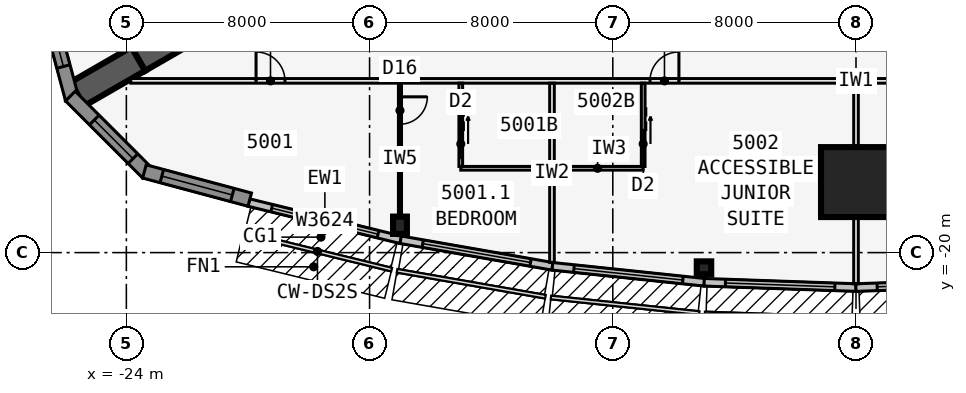
"""IFC4 building model, lengths in metres.
Left out: names, types, materials, properties, quantities, classifications, styles, units other than length and angle.
Written with IfcOpenShell. Run it as: python <this file> out.ifc"""

import sys

from ifc_helpers import new_model, si_unit, direction, frame, frame_2d, origin, origin_2d, place, context, subcontext, project, spatial, polyline, rectangle, i_section, outline, extrude, element, fill, save


model = new_model("IFC4")
c1 = context("Model", 3, precision=1e-05, world=origin(), true_north=direction((0.0, 1.0)))
c2 = subcontext(c1, "Body", "Model", "MODEL_VIEW")
j1 = project(units=[si_unit("LENGTHUNIT", "METRE"), si_unit("PLANEANGLEUNIT", "RADIAN")], contexts=[c1])
p1 = place(None, origin())
s1 = spatial("IfcSite", under=j1, at=p1, CompositionType="ELEMENT")
p2 = place(p1, origin())
s2 = spatial("IfcBuilding", under=s1, at=p2, CompositionType="ELEMENT")
p3 = place(p2, frame((0.0, 0.0, 186.1)))
s3 = spatial("IfcBuildingStorey", under=s2, at=p3, CompositionType="ELEMENT", Elevation=186.1)
for number, where, z_axis, x_axis in (
    (1, (-21.61, -12.477, 0.0), (0.0, 0.0, 1.0), (-0.866, -0.5, 0.0)),
    (2, (-23.61, -13.631, 0.0), (0.0, 0.0, 1.0), (-0.866, -0.5, 0.0)),
):
    element("IfcWall", number, at=place(p3, frame(where, z_axis=z_axis, x_axis=x_axis)), inside=s3, PredefinedType="SHEAR", context=c2, shape_type="SweptSolid", body=[
        extrude(rectangle(XDim=2.309, YDim=0.9, at=frame_2d((1.155, 0.0))), origin(), (0.0, 0.0, 1.0), 3.4),
    ])
p4 = place(p3, frame((-15.0, -19.1, 0.0), z_axis=(0.0, 0.0, 1.0), x_axis=(1.0, 0.0, 0.0)))
e3 = element("IfcColumn", 3, at=p4, inside=s3, PredefinedType="COLUMN", context=c2, shape_type="SweptSolid", body=[
    extrude(i_section(OverallWidth=0.455, OverallDepth=0.569, WebThickness=0.078, FlangeThickness=0.125, at=origin_2d()), origin(), (0.0, 0.0, 1.0), 3.4),
])
p5 = place(p3, frame((-5.0, -20.5, 0.0), z_axis=(0.0, 0.0, 1.0), x_axis=(0.0, -1.0, 0.0)))
e4 = element("IfcColumn", 4, at=p5, inside=s3, PredefinedType="COLUMN", context=c2, shape_type="SweptSolid", body=[
    extrude(i_section(OverallWidth=0.424, OverallDepth=0.475, WebThickness=0.048, FlangeThickness=0.077, at=origin_2d()), origin(), (0.0, 0.0, 1.0), 3.4),
])
p6 = place(p3, frame((0.0, -17.68, 0.0), z_axis=(0.0, 0.0, 1.0), x_axis=(0.0, -1.0, 0.0)))
e5 = element("IfcColumn", 5, at=p6, inside=s3, PredefinedType="COLUMN", context=c2, shape_type="SweptSolid", body=[
    extrude(rectangle(XDim=2.3, YDim=2.3, at=origin_2d()), origin(), (0.0, 0.0, 1.0), 3.4),
])
p7 = place(p3, frame((-19.97, -18.354, 0.0), z_axis=(0.0, 0.0, 1.0), x_axis=(0.971270024053, -0.237980126011, 0.0)))
e6 = element("IfcWall", 6, at=p7, inside=s3, PredefinedType="STANDARD", context=c2, shape_type="SweptSolid", body=[
    extrude(rectangle(XDim=5.148, YDim=0.25, at=frame_2d((2.574, 0.0))), origin(), (0.0, 0.0, 1.0), 3.15),
])
p8 = place(p7, frame((0.774, 0.0, 0.45)))
e7 = element("IfcOpeningElement", 7, at=p8, cuts=e6, PredefinedType="OPENING", context=c2, shape_type="SweptSolid", body=[
    extrude(rectangle(XDim=3.6, YDim=2.4, at=frame_2d((1.8, 1.2))), frame((0.0, 0.135, 0.0), z_axis=(0.0, -1.0, 0.0), x_axis=(1.0, 0.0, 0.0)), (0.0, 0.0, 1.0), 0.27),
])
p9 = place(p3, frame((-14.979, -19.577, 0.0), z_axis=(0.0, 0.0, 1.0), x_axis=(0.985030467156, -0.172380331752, 0.0)))
e8 = element("IfcWall", 8, at=p9, inside=s3, PredefinedType="STANDARD", context=c2, shape_type="SweptSolid", body=[
    extrude(rectangle(XDim=5.076, YDim=0.25, at=frame_2d((2.538, 0.0))), origin(), (0.0, 0.0, 1.0), 3.15),
])
p10 = place(p9, frame((0.738, 0.0, 0.45)))
e9 = element("IfcOpeningElement", 9, at=p10, cuts=e8, PredefinedType="OPENING", context=c2, shape_type="SweptSolid", body=[
    extrude(rectangle(XDim=3.6, YDim=2.4, at=frame_2d((1.8, 1.2))), frame((0.0, 0.135, 0.0), z_axis=(0.0, -1.0, 0.0), x_axis=(1.0, 0.0, 0.0)), (0.0, 0.0, 1.0), 0.27),
])
p11 = place(p3, frame((-9.987, -20.451, 0.0), z_axis=(0.0, 0.0, 1.0), x_axis=(0.994534683851, -0.104406717299, 0.0)))
e10 = element("IfcWall", 10, at=p11, inside=s3, PredefinedType="STANDARD", context=c2, shape_type="SweptSolid", body=[
    extrude(rectangle(XDim=5.028, YDim=0.25, at=frame_2d((2.514, 0.0))), origin(), (0.0, 0.0, 1.0), 3.15),
])
p12 = place(p11, frame((0.714, 0.0, 0.45)))
e11 = element("IfcOpeningElement", 11, at=p12, cuts=e10, PredefinedType="OPENING", context=c2, shape_type="SweptSolid", body=[
    extrude(rectangle(XDim=3.6, YDim=2.4, at=frame_2d((1.8, 1.2))), frame((0.0, 0.135, 0.0), z_axis=(0.0, -1.0, 0.0), x_axis=(1.0, 0.0, 0.0)), (0.0, 0.0, 1.0), 0.27),
])
p13 = place(p3, frame((-4.996, -20.975, 0.0), z_axis=(0.0, 0.0, 1.0), x_axis=(0.999387720943, -0.034988329879, 0.0)))
e12 = element("IfcWall", 12, at=p13, inside=s3, PredefinedType="STANDARD", context=c2, shape_type="SweptSolid", body=[
    extrude(rectangle(XDim=5.003, YDim=0.25, at=frame_2d((2.501, 0.0))), origin(), (0.0, 0.0, 1.0), 3.15),
])
p14 = place(p13, frame((0.701, 0.0, 0.45)))
e13 = element("IfcOpeningElement", 13, at=p14, cuts=e12, PredefinedType="OPENING", context=c2, shape_type="SweptSolid", body=[
    extrude(rectangle(XDim=3.6, YDim=2.4, at=frame_2d((1.8, 1.2))), frame((0.0, 0.135, 0.0), z_axis=(0.0, -1.0, 0.0), x_axis=(1.0, 0.0, 0.0)), (0.0, 0.0, 1.0), 0.27),
])
p15 = place(p3, frame((-0.004, -21.15, 0.0), z_axis=(0.0, 0.0, 1.0), x_axis=(0.999387720943, 0.034988329879, 0.0)))
e14 = element("IfcWall", 14, at=p15, inside=s3, PredefinedType="STANDARD", context=c2, shape_type="SweptSolid", body=[
    extrude(rectangle(XDim=5.003, YDim=0.25, at=frame_2d((2.501, 0.0))), origin(), (0.0, 0.0, 1.0), 3.15),
])
p16 = place(p15, frame((0.701, 0.0, 0.45)))
e15 = element("IfcOpeningElement", 15, at=p16, cuts=e14, PredefinedType="OPENING", context=c2, shape_type="SweptSolid", body=[
    extrude(rectangle(XDim=3.6, YDim=2.4, at=frame_2d((1.8, 1.2))), frame((0.0, 0.135, 0.0), z_axis=(0.0, -1.0, 0.0), x_axis=(1.0, 0.0, 0.0)), (0.0, 0.0, 1.0), 0.27),
])
p17 = place(p3, frame((-26.711, -11.489, 0.0), z_axis=(0.0, 0.0, 1.0), x_axis=(0.258823421857, -0.965924653531, 0.0)))
e16 = element("IfcWall", 16, at=p17, inside=s3, PredefinedType="SOLIDWALL", context=c2, shape_type="SweptSolid", body=[
    extrude(outline(polyline([(3.586, 0.225), (3.527, 0.225), (3.035, 0.093), (3.0, 0.225), (0.0, 0.225), (0.0, -0.225), (3.586, -0.225), (3.586, 0.225)])), origin(), (0.0, 0.0, 1.0), 3.15),
])
p18 = place(p17, frame((0.675, 0.0, 0.45)))
e17 = element("IfcOpeningElement", 17, at=p18, cuts=e16, PredefinedType="OPENING", context=c2, shape_type="SweptSolid", body=[
    extrude(rectangle(XDim=1.8, YDim=2.4, at=frame_2d((0.9, 1.2))), frame((0.0, 0.235, 0.0), z_axis=(0.0, -1.0, 0.0), x_axis=(1.0, 0.0, 0.0)), (0.0, 0.0, 1.0), 0.47),
])
p19 = place(p3, frame((-25.841, -14.852, 0.0), z_axis=(0.0, 0.0, 1.0), x_axis=(0.707106781187, -0.707106781187, 0.0)))
e18 = element("IfcWall", 18, at=p19, inside=s3, PredefinedType="SOLIDWALL", context=c2, shape_type="SweptSolid", body=[
    extrude(outline(polyline([(3.586, 0.225), (0.586, 0.225), (0.551, 0.093), (0.059, 0.225), (0.0, 0.225), (0.0, -0.225), (3.586, -0.225), (3.586, 0.225)])), origin(), (0.0, 0.0, 1.0), 3.15),
])
p20 = place(p19, frame((1.111, 0.0, 0.45)))
e19 = element("IfcOpeningElement", 19, at=p20, cuts=e18, PredefinedType="OPENING", context=c2, shape_type="SweptSolid", body=[
    extrude(rectangle(XDim=1.8, YDim=2.4, at=frame_2d((0.9, 1.2))), frame((0.0, 0.235, 0.0), z_axis=(0.0, -1.0, 0.0), x_axis=(1.0, 0.0, 0.0)), (0.0, 0.0, 1.0), 0.47),
])
p21 = place(p3, frame((-23.406, -17.33, 0.0), z_axis=(0.0, 0.0, 1.0), x_axis=(0.965924653531, -0.258823421857, 0.0)))
e20 = element("IfcWall", 20, at=p21, inside=s3, PredefinedType="SOLIDWALL", context=c2, shape_type="SweptSolid", body=[
    extrude(rectangle(XDim=3.586, YDim=0.45, at=frame_2d((1.793, 0.0))), origin(), (0.0, 0.0, 1.0), 3.15),
])
p22 = place(p21, frame((0.593, 0.0, 0.45)))
e21 = element("IfcOpeningElement", 21, at=p22, cuts=e20, PredefinedType="OPENING", context=c2, shape_type="SweptSolid", body=[
    extrude(rectangle(XDim=2.4, YDim=2.4, at=frame_2d((1.2, 1.2))), frame((0.0, 0.235, 0.0), z_axis=(0.0, -1.0, 0.0), x_axis=(1.0, 0.0, 0.0)), (0.0, 0.0, 1.0), 0.47),
])
p23 = place(p3, frame((-23.857, -14.351, 0.0), z_axis=(0.0, 0.0, 1.0), x_axis=(1.0, 0.0, 0.0)))
e22 = element("IfcWall", 22, at=p23, inside=s3, PredefinedType="PARTITIONING", context=c2, shape_type="SweptSolid", body=[
    extrude(rectangle(XDim=47.714, YDim=0.15, at=frame_2d((23.857, 0.0))), origin(), (0.0, 0.0, 1.0), 3.15),
])
p24 = place(p23, frame((4.123, 0.0, 0.0)))
e23 = element("IfcOpeningElement", 23, at=p24, cuts=e22, PredefinedType="OPENING", context=c2, shape_type="SweptSolid", body=[
    extrude(rectangle(XDim=0.95, YDim=2.13, at=frame_2d((0.475, 1.065))), frame((0.0, 0.085, 0.0), z_axis=(0.0, -1.0, 0.0), x_axis=(1.0, 0.0, 0.0)), (0.0, 0.0, 1.0), 0.17),
])
p25 = place(p23, frame((17.082, 0.0, 0.0)))
e24 = element("IfcOpeningElement", 24, at=p25, cuts=e22, PredefinedType="OPENING", context=c2, shape_type="SweptSolid", body=[
    extrude(rectangle(XDim=0.95, YDim=2.13, at=frame_2d((0.475, 1.065))), frame((0.0, 0.085, 0.0), z_axis=(0.0, -1.0, 0.0), x_axis=(1.0, 0.0, 0.0)), (0.0, 0.0, 1.0), 0.17),
])
p26 = place(p23, frame((25.857, 0.0, 0.0)))
e25 = element("IfcOpeningElement", 25, at=p26, cuts=e22, PredefinedType="OPENING", context=c2, shape_type="SweptSolid", body=[
    extrude(rectangle(XDim=1.0, YDim=2.13, at=frame_2d((0.5, 1.065))), frame((0.0, 0.085, 0.0), z_axis=(0.0, -1.0, 0.0), x_axis=(1.0, 0.0, 0.0)), (0.0, 0.0, 1.0), 0.17),
])
p27 = place(p23, frame((30.882, 0.0, 0.0)))
e26 = element("IfcOpeningElement", 26, at=p27, cuts=e22, PredefinedType="OPENING", context=c2, shape_type="SweptSolid", body=[
    extrude(rectangle(XDim=0.95, YDim=2.13, at=frame_2d((0.475, 1.065))), frame((0.0, 0.085, 0.0), z_axis=(0.0, -1.0, 0.0), x_axis=(1.0, 0.0, 0.0)), (0.0, 0.0, 1.0), 0.17),
])
p28 = place(p23, frame((42.082, 0.0, 0.0)))
e27 = element("IfcOpeningElement", 27, at=p28, cuts=e22, PredefinedType="OPENING", context=c2, shape_type="SweptSolid", body=[
    extrude(rectangle(XDim=0.95, YDim=2.13, at=frame_2d((0.475, 1.065))), frame((0.0, 0.085, 0.0), z_axis=(0.0, -1.0, 0.0), x_axis=(1.0, 0.0, 0.0)), (0.0, 0.0, 1.0), 0.17),
])
p29 = place(p3, frame((-15.0, -14.426, 0.0), z_axis=(0.0, 0.0, 1.0), x_axis=(0.0, -1.0, 0.0)))
e28 = element("IfcWall", 28, at=p29, inside=s3, PredefinedType="PARTITIONING", context=c2, shape_type="SweptSolid", body=[
    extrude(rectangle(XDim=5.017, YDim=0.1, at=frame_2d((2.508, 0.0))), origin(), (0.0, 0.0, 1.0), 2.05),
])
p30 = place(p29, frame((0.45, 0.0, 0.0)))
e29 = element("IfcOpeningElement", 29, at=p30, cuts=e28, PredefinedType="OPENING", context=c2, shape_type="SweptSolid", body=[
    extrude(rectangle(XDim=0.9, YDim=2.032, at=frame_2d((0.45, 1.016))), frame((0.0, 0.06, 0.0), z_axis=(0.0, -1.0, 0.0), x_axis=(1.0, 0.0, 0.0)), (0.0, 0.0, 1.0), 0.12),
])
p31 = place(p3, frame((-10.0, -14.426, 0.0), z_axis=(0.0, 0.0, 1.0), x_axis=(0.0, -1.0, 0.0)))
e30 = element("IfcWall", 30, at=p31, inside=s3, PredefinedType="PARTITIONING", context=c2, shape_type="SweptSolid", body=[
    extrude(rectangle(XDim=5.895, YDim=0.15, at=frame_2d((2.948, 0.0))), origin(), (0.0, 0.0, 1.0), 2.108),
])
p32 = place(p3, frame((0.0, -14.426, 0.0), z_axis=(0.0, 0.0, 1.0), x_axis=(0.0, -1.0, 0.0)))
e31 = element("IfcWall", 31, at=p32, inside=s3, PredefinedType="PARTITIONING", context=c2, shape_type="SweptSolid", body=[
    extrude(rectangle(XDim=6.599, YDim=0.15, at=frame_2d((3.299, 0.0))), origin(), (0.0, 0.0, 1.0), 2.108),
])
p33 = place(p3, frame((-13.0, -17.226, 0.0), z_axis=(0.0, 0.0, 1.0), x_axis=(1.0, 0.0, 0.0)))
e32 = element("IfcWall", 32, at=p33, inside=s3, PredefinedType="PLUMBINGWALL", context=c2, shape_type="SweptSolid", body=[
    extrude(rectangle(XDim=3.0, YDim=0.12, at=frame_2d((1.5, 0.0))), origin(), (0.0, 0.0, 1.0), 3.15),
])
p34 = place(p3, frame((-13.0, -14.426, 0.0), z_axis=(0.0, 0.0, 1.0), x_axis=(0.0, -1.0, 0.0)))
e33 = element("IfcWall", 33, at=p34, inside=s3, PredefinedType="PLUMBINGWALL", context=c2, shape_type="SweptSolid", body=[
    extrude(rectangle(XDim=2.74, YDim=0.12, at=frame_2d((1.37, 0.0))), origin(), (0.0, 0.0, 1.0), 3.15),
])
p35 = place(p34, frame((1.55, 0.0, 0.0)))
e34 = element("IfcOpeningElement", 34, at=p35, cuts=e33, PredefinedType="OPENING", context=c2, shape_type="SweptSolid", body=[
    extrude(rectangle(XDim=0.9, YDim=2.13, at=frame_2d((0.45, 1.065))), frame((0.0, 0.07, 0.0), z_axis=(0.0, -1.0, 0.0), x_axis=(1.0, 0.0, 0.0)), (0.0, 0.0, 1.0), 0.14),
])
p36 = place(p3, frame((-10.0, -17.226, 0.0), z_axis=(0.0, 0.0, 1.0), x_axis=(1.0, 0.0, 0.0)))
e35 = element("IfcWall", 35, at=p36, inside=s3, PredefinedType="PLUMBINGWALL", context=c2, shape_type="SweptSolid", body=[
    extrude(rectangle(XDim=3.0, YDim=0.12, at=frame_2d((1.5, 0.0))), origin(), (0.0, 0.0, 1.0), 3.15),
])
p37 = place(p3, frame((-7.0, -14.426, 0.0), z_axis=(0.0, 0.0, 1.0), x_axis=(0.0, -1.0, 0.0)))
e36 = element("IfcWall", 36, at=p37, inside=s3, PredefinedType="PLUMBINGWALL", context=c2, shape_type="SweptSolid", body=[
    extrude(rectangle(XDim=2.74, YDim=0.12, at=frame_2d((1.37, 0.0))), origin(), (0.0, 0.0, 1.0), 3.15),
])
p38 = place(p37, frame((1.55, 0.0, 0.0)))
e37 = element("IfcOpeningElement", 37, at=p38, cuts=e36, PredefinedType="OPENING", context=c2, shape_type="SweptSolid", body=[
    extrude(rectangle(XDim=0.9, YDim=2.13, at=frame_2d((0.45, 1.065))), frame((0.0, 0.07, 0.0), z_axis=(0.0, -1.0, 0.0), x_axis=(1.0, 0.0, 0.0)), (0.0, 0.0, 1.0), 0.14),
])
p39 = place(p8, origin())
e38 = element("IfcWindow", 38, at=p39, inside=s3, PartitioningType="SINGLE_PANEL", PredefinedType="WINDOW", context=c2, shape_type="SweptSolid", body=[
    extrude(rectangle(XDim=3.6, YDim=2.4, at=frame_2d((1.8, 1.2))), frame((0.0, 0.03, 0.0), z_axis=(0.0, -1.0, 0.0), x_axis=(1.0, 0.0, 0.0)), (0.0, 0.0, 1.0), 0.06),
])
fill(e7, e38)
p40 = place(p10, origin())
e39 = element("IfcWindow", 39, at=p40, inside=s3, PartitioningType="SINGLE_PANEL", PredefinedType="WINDOW", context=c2, shape_type="SweptSolid", body=[
    extrude(rectangle(XDim=3.6, YDim=2.4, at=frame_2d((1.8, 1.2))), frame((0.0, 0.03, 0.0), z_axis=(0.0, -1.0, 0.0), x_axis=(1.0, 0.0, 0.0)), (0.0, 0.0, 1.0), 0.06),
])
fill(e9, e39)
p41 = place(p12, origin())
e40 = element("IfcWindow", 40, at=p41, inside=s3, PartitioningType="SINGLE_PANEL", PredefinedType="WINDOW", context=c2, shape_type="SweptSolid", body=[
    extrude(rectangle(XDim=3.6, YDim=2.4, at=frame_2d((1.8, 1.2))), frame((0.0, 0.03, 0.0), z_axis=(0.0, -1.0, 0.0), x_axis=(1.0, 0.0, 0.0)), (0.0, 0.0, 1.0), 0.06),
])
fill(e11, e40)
p42 = place(p14, origin())
e41 = element("IfcWindow", 41, at=p42, inside=s3, PartitioningType="SINGLE_PANEL", PredefinedType="WINDOW", context=c2, shape_type="SweptSolid", body=[
    extrude(rectangle(XDim=3.6, YDim=2.4, at=frame_2d((1.8, 1.2))), frame((0.0, 0.03, 0.0), z_axis=(0.0, -1.0, 0.0), x_axis=(1.0, 0.0, 0.0)), (0.0, 0.0, 1.0), 0.06),
])
fill(e13, e41)
p43 = place(p16, origin())
e42 = element("IfcWindow", 42, at=p43, inside=s3, PartitioningType="SINGLE_PANEL", PredefinedType="WINDOW", context=c2, shape_type="SweptSolid", body=[
    extrude(rectangle(XDim=3.6, YDim=2.4, at=frame_2d((1.8, 1.2))), frame((0.0, 0.03, 0.0), z_axis=(0.0, -1.0, 0.0), x_axis=(1.0, 0.0, 0.0)), (0.0, 0.0, 1.0), 0.06),
])
fill(e15, e42)
p44 = place(p18, origin())
e43 = element("IfcWindow", 43, at=p44, inside=s3, PartitioningType="SINGLE_PANEL", PredefinedType="WINDOW", context=c2, shape_type="SweptSolid", body=[
    extrude(rectangle(XDim=1.8, YDim=2.4, at=frame_2d((0.9, 1.2))), frame((0.0, 0.03, 0.0), z_axis=(0.0, -1.0, 0.0), x_axis=(1.0, 0.0, 0.0)), (0.0, 0.0, 1.0), 0.06),
])
fill(e17, e43)
p45 = place(p20, origin())
e44 = element("IfcWindow", 44, at=p45, inside=s3, PartitioningType="SINGLE_PANEL", PredefinedType="WINDOW", context=c2, shape_type="SweptSolid", body=[
    extrude(rectangle(XDim=1.8, YDim=2.4, at=frame_2d((0.9, 1.2))), frame((0.0, 0.03, 0.0), z_axis=(0.0, -1.0, 0.0), x_axis=(1.0, 0.0, 0.0)), (0.0, 0.0, 1.0), 0.06),
])
fill(e19, e44)
p46 = place(p22, origin())
e45 = element("IfcWindow", 45, at=p46, inside=s3, PartitioningType="SINGLE_PANEL", PredefinedType="WINDOW", context=c2, shape_type="SweptSolid", body=[
    extrude(rectangle(XDim=2.4, YDim=2.4, at=frame_2d((1.2, 1.2))), frame((0.0, 0.03, 0.0), z_axis=(0.0, -1.0, 0.0), x_axis=(1.0, 0.0, 0.0)), (0.0, 0.0, 1.0), 0.06),
])
fill(e21, e45)
p47 = place(p30, origin())
e46 = element("IfcDoor", 46, at=p47, inside=s3, OperationType="SINGLE_SWING_LEFT", PredefinedType="DOOR", context=c2, shape_type="SweptSolid", body=[
    extrude(rectangle(XDim=0.9, YDim=2.032, at=frame_2d((0.45, 1.016))), frame((0.0, 0.025, 0.0), z_axis=(0.0, -1.0, 0.0), x_axis=(1.0, 0.0, 0.0)), (0.0, 0.0, 1.0), 0.05),
])
fill(e29, e46)
p48 = place(p24, origin())
e47 = element("IfcDoor", 47, at=p48, inside=s3, OperationType="SINGLE_SWING_LEFT", PredefinedType="DOOR", context=c2, shape_type="SweptSolid", body=[
    extrude(rectangle(XDim=0.95, YDim=2.13, at=frame_2d((0.475, 1.065))), frame((0.0, 0.025, 0.0), z_axis=(0.0, -1.0, 0.0), x_axis=(1.0, 0.0, 0.0)), (0.0, 0.0, 1.0), 0.05),
])
fill(e23, e47)
p49 = place(p35, origin())
e48 = element("IfcDoor", 48, at=p49, inside=s3, OperationType="SLIDING_TO_LEFT", PredefinedType="DOOR", context=c2, shape_type="SweptSolid", body=[
    extrude(rectangle(XDim=0.9, YDim=2.13, at=frame_2d((0.45, 1.065))), frame((0.0, 0.025, 0.0), z_axis=(0.0, -1.0, 0.0), x_axis=(1.0, 0.0, 0.0)), (0.0, 0.0, 1.0), 0.05),
])
fill(e34, e48)
p50 = place(p38, origin())
e49 = element("IfcDoor", 49, at=p50, inside=s3, OperationType="SLIDING_TO_LEFT", PredefinedType="DOOR", context=c2, shape_type="SweptSolid", body=[
    extrude(rectangle(XDim=0.9, YDim=2.13, at=frame_2d((0.45, 1.065))), frame((0.0, 0.025, 0.0), z_axis=(0.0, -1.0, 0.0), x_axis=(1.0, 0.0, 0.0)), (0.0, 0.0, 1.0), 0.05),
])
fill(e37, e49)
p51 = place(p25, origin())
e50 = element("IfcDoor", 50, at=p51, inside=s3, OperationType="SINGLE_SWING_RIGHT", PredefinedType="DOOR", context=c2, shape_type="SweptSolid", body=[
    extrude(rectangle(XDim=0.95, YDim=2.13, at=frame_2d((0.475, 1.065))), frame((0.0, 0.025, 0.0), z_axis=(0.0, -1.0, 0.0), x_axis=(1.0, 0.0, 0.0)), (0.0, 0.0, 1.0), 0.05),
])
fill(e24, e50)
save(model, sys.argv[1])
